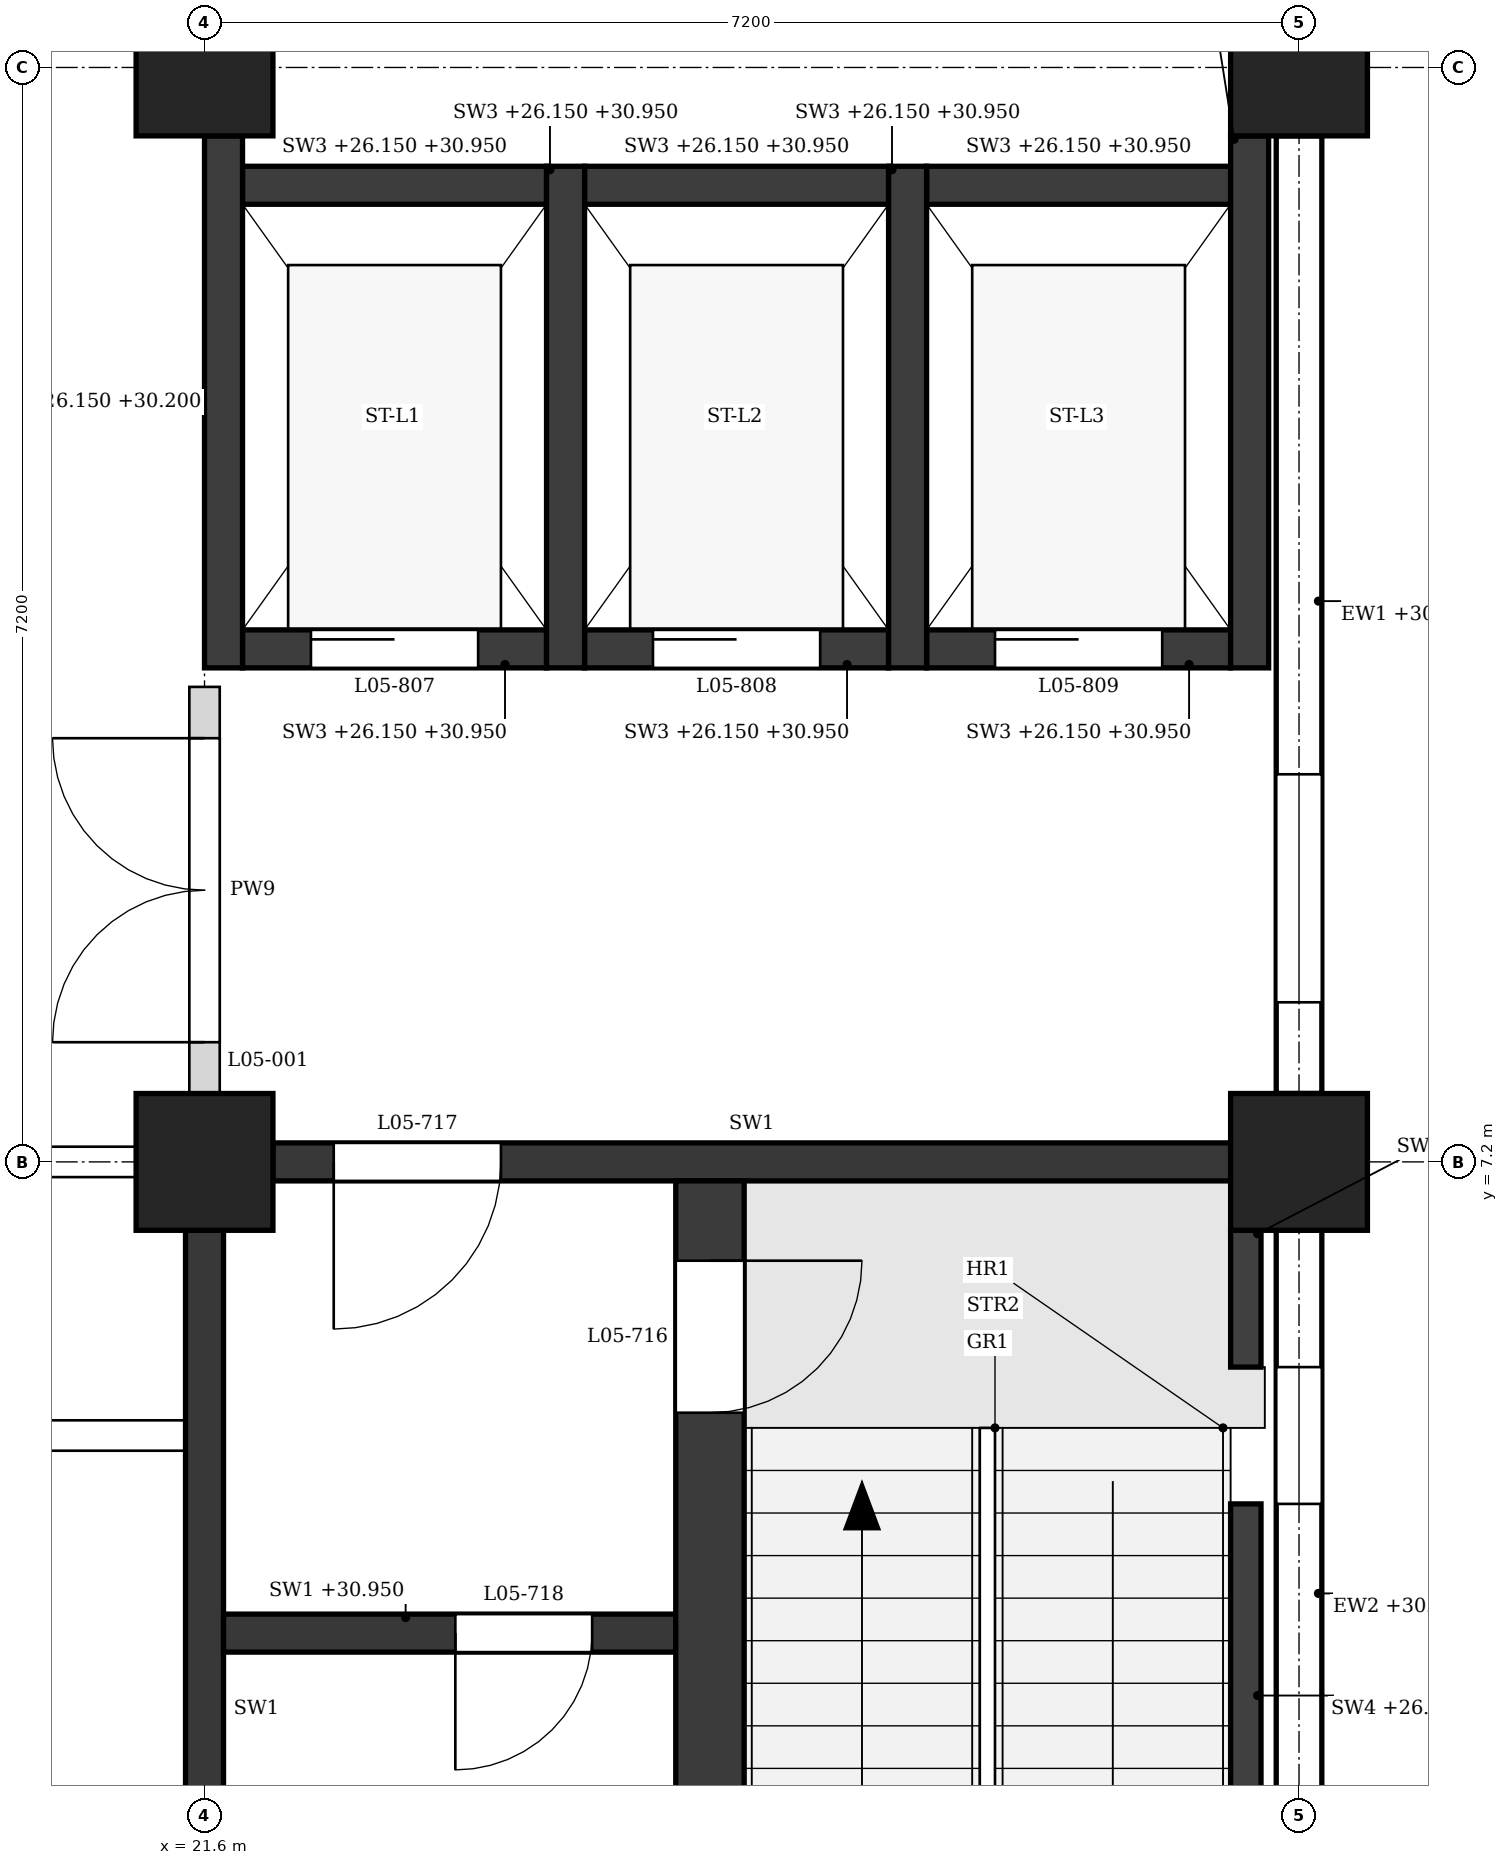
"""IFC4 building model, lengths in metres.
Left out: names, types, materials, properties, quantities, classifications, styles, units other than length and angle.
Written with IfcOpenShell. Run it as: python <this file> out.ifc"""

import sys

from ifc_helpers import new_model, si_unit, direction, frame, frame_2d, origin, origin_2d, place, context, subcontext, project, spatial, polyline, rectangle, outline, extrude, element, fill, save


model = new_model("IFC4")
c1 = context("Model", 3, precision=1e-05, world=origin(), true_north=direction((0.0, 1.0)))
c2 = subcontext(c1, "Body", "Model", "MODEL_VIEW")
j1 = project(units=[si_unit("LENGTHUNIT", "METRE"), si_unit("PLANEANGLEUNIT", "RADIAN")], contexts=[c1])
p1 = place(None, origin())
s1 = spatial("IfcSite", under=j1, at=p1, CompositionType="ELEMENT")
p2 = place(p1, origin())
s2 = spatial("IfcBuilding", under=s1, at=p2, CompositionType="ELEMENT")
p3 = place(p2, frame((0.0, 0.0, 26.4)))
s3 = spatial("IfcBuildingStorey", under=s2, at=p3, CompositionType="ELEMENT", Elevation=26.4)
for number, where, z_axis, x_axis in (
    (1, (21.6, 7.2, 0.0), (0.0, 0.0, 1.0), (1.0, 0.0, 0.0)),
    (2, (21.6, 14.4, 0.0), (0.0, 0.0, 1.0), (1.0, 0.0, 0.0)),
    (3, (28.8, 7.2, 0.0), (0.0, 0.0, 1.0), (1.0, 0.0, 0.0)),
    (4, (28.8, 14.4, 0.0), (0.0, 0.0, 1.0), (1.0, 0.0, 0.0)),
):
    element("IfcColumn", number, at=place(p3, frame(where, z_axis=z_axis, x_axis=x_axis)), inside=s3, PredefinedType="COLUMN", context=c2, shape_type="SweptSolid", body=[
        extrude(rectangle(XDim=0.9, YDim=0.9, at=origin_2d()), origin(), (0.0, 0.0, 1.0), 4.8),
    ])
p4 = place(p3, frame((28.8, 0.45, 0.0), z_axis=(0.0, 0.0, 1.0), x_axis=(0.0, 1.0, 0.0)))
e5 = element("IfcWall", 5, at=p4, inside=s3, PredefinedType="STANDARD", context=c2, shape_type="SweptSolid", body=[
    extrude(rectangle(XDim=6.3, YDim=0.3, at=frame_2d((3.15, 0.0))), origin(), (0.0, 0.0, 1.0), 3.95),
])
p5 = place(p4, frame((0.9, 0.0, 0.9)))
e6 = element("IfcOpeningElement", 6, at=p5, cuts=e5, PredefinedType="OPENING", context=c2, shape_type="SweptSolid", body=[
    extrude(outline(polyline([(0.0, 0.0), (0.9, 0.0), (0.9, 2.05), (0.45, 2.5), (0.0, 2.05), (0.0, 0.0)])), frame((0.0, 0.16, 0.0), z_axis=(0.0, -1.0, 0.0), x_axis=(1.0, 0.0, 0.0)), (0.0, 0.0, 1.0), 0.32),
])
p6 = place(p4, frame((4.5, 0.0, 0.9)))
e7 = element("IfcOpeningElement", 7, at=p6, cuts=e5, PredefinedType="OPENING", context=c2, shape_type="SweptSolid", body=[
    extrude(outline(polyline([(0.0, 0.0), (0.9, 0.0), (0.9, 2.05), (0.45, 2.5), (0.0, 2.05), (0.0, 0.0)])), frame((0.0, 0.16, 0.0), z_axis=(0.0, -1.0, 0.0), x_axis=(1.0, 0.0, 0.0)), (0.0, 0.0, 1.0), 0.32),
])
p7 = place(p3, frame((28.8, 7.65, 0.0), z_axis=(0.0, 0.0, 1.0), x_axis=(0.0, 1.0, 0.0)))
e8 = element("IfcWall", 8, at=p7, inside=s3, PredefinedType="STANDARD", context=c2, shape_type="SweptSolid", body=[
    extrude(rectangle(XDim=6.3, YDim=0.3, at=frame_2d((3.15, 0.0))), origin(), (0.0, 0.0, 1.0), 3.95),
])
p8 = place(p7, frame((0.6, 0.0, 0.9)))
e9 = element("IfcOpeningElement", 9, at=p8, cuts=e8, PredefinedType="OPENING", context=c2, shape_type="SweptSolid", body=[
    extrude(outline(polyline([(0.0, 0.0), (1.5, 0.0), (1.5, 1.75), (0.75, 2.5), (0.0, 1.75), (0.0, 0.0)])), frame((0.0, 0.16, 0.0), z_axis=(0.0, -1.0, 0.0), x_axis=(1.0, 0.0, 0.0)), (0.0, 0.0, 1.0), 0.32),
])
p9 = place(p3, frame((22.05, 7.2, 0.0), z_axis=(0.0, 0.0, 1.0), x_axis=(1.0, 0.0, 0.0)))
e10 = element("IfcWall", 10, at=p9, inside=s3, PredefinedType="SHEAR", context=c2, shape_type="SweptSolid", body=[
    extrude(rectangle(XDim=6.3, YDim=0.25, at=frame_2d((3.15, 0.0))), origin(), (0.0, 0.0, 1.0), 3.8),
])
p10 = place(p9, frame((0.4, 0.0, 0.0)))
e11 = element("IfcOpeningElement", 11, at=p10, cuts=e10, PredefinedType="OPENING", context=c2, shape_type="SweptSolid", body=[
    extrude(rectangle(XDim=1.1, YDim=2.1, at=frame_2d((0.55, 1.05))), frame((0.0, 0.135, 0.0), z_axis=(0.0, -1.0, 0.0), x_axis=(1.0, 0.0, 0.0)), (0.0, 0.0, 1.0), 0.27),
])
p11 = place(p3, frame((21.6, 0.45, 0.0), z_axis=(0.0, 0.0, 1.0), x_axis=(0.0, 1.0, 0.0)))
e12 = element("IfcWall", 12, at=p11, inside=s3, PredefinedType="SHEAR", context=c2, shape_type="SweptSolid", body=[
    extrude(rectangle(XDim=6.3, YDim=0.25, at=frame_2d((3.15, 0.0))), origin(), (0.0, 0.0, 1.0), 3.8),
])
p12 = place(p3, frame((28.45, 2.25, -0.25), z_axis=(0.0, 0.0, 1.0), x_axis=(0.0, 1.0, 0.0)))
e13 = element("IfcWall", 13, at=p12, inside=s3, PredefinedType="SHEAR", context=c2, shape_type="SweptSolid", body=[
    extrude(rectangle(XDim=2.7, YDim=0.2, at=frame_2d((1.35, 0.0))), origin(), (0.0, 0.0, 1.0), 4.8),
])
p13 = place(p3, frame((28.45, 5.85, -0.25), z_axis=(0.0, 0.0, 1.0), x_axis=(0.0, 1.0, 0.0)))
e14 = element("IfcWall", 14, at=p13, inside=s3, PredefinedType="SHEAR", context=c2, shape_type="SweptSolid", body=[
    extrude(rectangle(XDim=0.9, YDim=0.2, at=frame_2d((0.45, 0.0))), origin(), (0.0, 0.0, 1.0), 4.8),
])
p14 = place(p3, frame((24.925, 0.225, 0.0), z_axis=(0.0, 0.0, 1.0), x_axis=(0.0, 1.0, 0.0)))
e15 = element("IfcWall", 15, at=p14, inside=s3, PredefinedType="SHEAR", context=c2, shape_type="SweptSolid", body=[
    extrude(rectangle(XDim=6.85, YDim=0.45, at=frame_2d((3.425, 0.0))), origin(), (0.0, 0.0, 1.0), 4.55),
])
p15 = place(p14, frame((5.325, 0.0, 0.0)))
e16 = element("IfcOpeningElement", 16, at=p15, cuts=e15, PredefinedType="OPENING", context=c2, shape_type="SweptSolid", body=[
    extrude(rectangle(XDim=1.0, YDim=2.1, at=frame_2d((0.5, 1.05))), frame((0.0, 0.235, 0.0), z_axis=(0.0, -1.0, 0.0), x_axis=(1.0, 0.0, 0.0)), (0.0, 0.0, 1.0), 0.47),
])
p16 = place(p3, frame((21.725, 4.1, 0.0), z_axis=(0.0, 0.0, 1.0), x_axis=(1.0, 0.0, 0.0)))
e17 = element("IfcWall", 17, at=p16, inside=s3, PredefinedType="SHEAR", context=c2, shape_type="SweptSolid", body=[
    extrude(rectangle(XDim=2.975, YDim=0.25, at=frame_2d((1.487, 0.0))), origin(), (0.0, 0.0, 1.0), 4.55),
])
p17 = place(p16, frame((1.525, 0.0, 0.0)))
e18 = element("IfcOpeningElement", 18, at=p17, cuts=e17, PredefinedType="OPENING", context=c2, shape_type="SweptSolid", body=[
    extrude(rectangle(XDim=0.9, YDim=2.1, at=frame_2d((0.45, 1.05))), frame((0.0, 0.135, 0.0), z_axis=(0.0, -1.0, 0.0), x_axis=(1.0, 0.0, 0.0)), (0.0, 0.0, 1.0), 0.27),
])
p18 = place(p3, frame((21.725, 10.45, -0.25), z_axis=(0.0, 0.0, 1.0), x_axis=(0.0, 1.0, 0.0)))
e19 = element("IfcWall", 19, at=p18, inside=s3, PredefinedType="SHEAR", context=c2, shape_type="SweptSolid", body=[
    extrude(rectangle(XDim=3.5, YDim=0.25, at=frame_2d((1.75, 0.0))), origin(), (0.0, 0.0, 1.0), 4.05),
])
for number, where, z_axis, x_axis in (
    (20, (23.975, 10.45, -0.25), (0.0, 0.0, 1.0), (0.0, 1.0, 0.0)),
    (21, (26.225, 10.45, -0.25), (0.0, 0.0, 1.0), (0.0, 1.0, 0.0)),
):
    element("IfcWall", number, at=place(p3, frame(where, z_axis=z_axis, x_axis=x_axis)), inside=s3, PredefinedType="SHEAR", context=c2, shape_type="SweptSolid", body=[
        extrude(rectangle(XDim=3.3, YDim=0.25, at=frame_2d((1.65, 0.0))), origin(), (0.0, 0.0, 1.0), 4.8),
    ])
p19 = place(p3, frame((28.475, 10.45, -0.25), z_axis=(0.0, 0.0, 1.0), x_axis=(0.0, 1.0, 0.0)))
e22 = element("IfcWall", 22, at=p19, inside=s3, PredefinedType="SHEAR", context=c2, shape_type="SweptSolid", body=[
    extrude(rectangle(XDim=3.5, YDim=0.25, at=frame_2d((1.75, 0.0))), origin(), (0.0, 0.0, 1.0), 4.8),
])
p20 = place(p3, frame((21.85, 10.575, -0.25), z_axis=(0.0, 0.0, 1.0), x_axis=(1.0, 0.0, 0.0)))
e23 = element("IfcWall", 23, at=p20, inside=s3, PredefinedType="SHEAR", context=c2, shape_type="SweptSolid", body=[
    extrude(rectangle(XDim=2.0, YDim=0.25, at=frame_2d((1.0, 0.0))), origin(), (0.0, 0.0, 1.0), 4.8),
])
p21 = place(p20, frame((0.45, 0.0, 0.25)))
e24 = element("IfcOpeningElement", 24, at=p21, cuts=e23, PredefinedType="OPENING", context=c2, shape_type="SweptSolid", body=[
    extrude(rectangle(XDim=1.1, YDim=2.1, at=frame_2d((0.55, 1.05))), frame((0.0, 0.135, 0.0), z_axis=(0.0, -1.0, 0.0), x_axis=(1.0, 0.0, 0.0)), (0.0, 0.0, 1.0), 0.27),
])
p22 = place(p3, frame((21.85, 13.625, -0.25), z_axis=(0.0, 0.0, 1.0), x_axis=(1.0, 0.0, 0.0)))
e25 = element("IfcWall", 25, at=p22, inside=s3, PredefinedType="SHEAR", context=c2, shape_type="SweptSolid", body=[
    extrude(rectangle(XDim=2.0, YDim=0.25, at=frame_2d((1.0, 0.0))), origin(), (0.0, 0.0, 1.0), 4.8),
])
p23 = place(p3, frame((24.1, 10.575, -0.25), z_axis=(0.0, 0.0, 1.0), x_axis=(1.0, 0.0, 0.0)))
e26 = element("IfcWall", 26, at=p23, inside=s3, PredefinedType="SHEAR", context=c2, shape_type="SweptSolid", body=[
    extrude(rectangle(XDim=2.0, YDim=0.25, at=frame_2d((1.0, 0.0))), origin(), (0.0, 0.0, 1.0), 4.8),
])
p24 = place(p23, frame((0.45, 0.0, 0.25)))
e27 = element("IfcOpeningElement", 27, at=p24, cuts=e26, PredefinedType="OPENING", context=c2, shape_type="SweptSolid", body=[
    extrude(rectangle(XDim=1.1, YDim=2.1, at=frame_2d((0.55, 1.05))), frame((0.0, 0.135, 0.0), z_axis=(0.0, -1.0, 0.0), x_axis=(1.0, 0.0, 0.0)), (0.0, 0.0, 1.0), 0.27),
])
p25 = place(p3, frame((24.1, 13.625, -0.25), z_axis=(0.0, 0.0, 1.0), x_axis=(1.0, 0.0, 0.0)))
e28 = element("IfcWall", 28, at=p25, inside=s3, PredefinedType="SHEAR", context=c2, shape_type="SweptSolid", body=[
    extrude(rectangle(XDim=2.0, YDim=0.25, at=frame_2d((1.0, 0.0))), origin(), (0.0, 0.0, 1.0), 4.8),
])
p26 = place(p3, frame((26.35, 10.575, -0.25), z_axis=(0.0, 0.0, 1.0), x_axis=(1.0, 0.0, 0.0)))
e29 = element("IfcWall", 29, at=p26, inside=s3, PredefinedType="SHEAR", context=c2, shape_type="SweptSolid", body=[
    extrude(rectangle(XDim=2.0, YDim=0.25, at=frame_2d((1.0, 0.0))), origin(), (0.0, 0.0, 1.0), 4.8),
])
p27 = place(p26, frame((0.45, 0.0, 0.25)))
e30 = element("IfcOpeningElement", 30, at=p27, cuts=e29, PredefinedType="OPENING", context=c2, shape_type="SweptSolid", body=[
    extrude(rectangle(XDim=1.1, YDim=2.1, at=frame_2d((0.55, 1.05))), frame((0.0, 0.135, 0.0), z_axis=(0.0, -1.0, 0.0), x_axis=(1.0, 0.0, 0.0)), (0.0, 0.0, 1.0), 0.27),
])
p28 = place(p3, frame((26.35, 13.625, -0.25), z_axis=(0.0, 0.0, 1.0), x_axis=(1.0, 0.0, 0.0)))
e31 = element("IfcWall", 31, at=p28, inside=s3, PredefinedType="SHEAR", context=c2, shape_type="SweptSolid", body=[
    extrude(rectangle(XDim=2.0, YDim=0.25, at=frame_2d((1.0, 0.0))), origin(), (0.0, 0.0, 1.0), 4.8),
])
p29 = place(p3, frame((7.325, 5.4, 0.0), z_axis=(0.0, 0.0, 1.0), x_axis=(1.0, 0.0, 0.0)))
e32 = element("IfcWall", 32, at=p29, inside=s3, PredefinedType="PARTITIONING", context=c2, shape_type="SweptSolid", body=[
    extrude(outline(polyline([(0.0, 0.0), (14.15, 0.0), (14.15, 3.8), (14.025, 3.8), (14.025, 4.55), (7.325, 4.55), (7.325, 3.8), (6.825, 3.8), (6.825, 4.55), (0.125, 4.55), (0.125, 3.8), (0.0, 3.8), (0.0, 0.0)])), frame((0.0, 0.1, 0.0), z_axis=(0.0, -1.0, 0.0), x_axis=(1.0, 0.0, 0.0)), (0.0, 0.0, 1.0), 0.2),
])
p30 = place(p29, frame((1.238, 0.0, 0.0)))
e33 = element("IfcOpeningElement", 33, at=p30, cuts=e32, PredefinedType="OPENING", context=c2, shape_type="SweptSolid", body=[
    extrude(rectangle(XDim=1.0, YDim=2.1, at=frame_2d((0.5, 1.05))), frame((0.0, 0.11, 0.0), z_axis=(0.0, -1.0, 0.0), x_axis=(1.0, 0.0, 0.0)), (0.0, 0.0, 1.0), 0.22),
])
p31 = place(p29, frame((4.775, 0.0, 0.0)))
e34 = element("IfcOpeningElement", 34, at=p31, cuts=e32, PredefinedType="OPENING", context=c2, shape_type="SweptSolid", body=[
    extrude(rectangle(XDim=1.0, YDim=2.1, at=frame_2d((0.5, 1.05))), frame((0.0, 0.11, 0.0), z_axis=(0.0, -1.0, 0.0), x_axis=(1.0, 0.0, 0.0)), (0.0, 0.0, 1.0), 0.22),
])
p32 = place(p29, frame((8.375, 0.0, 0.0)))
e35 = element("IfcOpeningElement", 35, at=p32, cuts=e32, PredefinedType="OPENING", context=c2, shape_type="SweptSolid", body=[
    extrude(rectangle(XDim=1.0, YDim=2.1, at=frame_2d((0.5, 1.05))), frame((0.0, 0.11, 0.0), z_axis=(0.0, -1.0, 0.0), x_axis=(1.0, 0.0, 0.0)), (0.0, 0.0, 1.0), 0.22),
])
p33 = place(p29, frame((11.913, 0.0, 0.0)))
e36 = element("IfcOpeningElement", 36, at=p33, cuts=e32, PredefinedType="OPENING", context=c2, shape_type="SweptSolid", body=[
    extrude(rectangle(XDim=1.0, YDim=2.1, at=frame_2d((0.5, 1.05))), frame((0.0, 0.11, 0.0), z_axis=(0.0, -1.0, 0.0), x_axis=(1.0, 0.0, 0.0)), (0.0, 0.0, 1.0), 0.22),
])
p34 = place(p3, frame((14.85, 7.2, 0.0), z_axis=(0.0, 0.0, 1.0), x_axis=(1.0, 0.0, 0.0)))
e37 = element("IfcWall", 37, at=p34, inside=s3, PredefinedType="PARTITIONING", context=c2, shape_type="SweptSolid", body=[
    extrude(rectangle(XDim=6.3, YDim=0.2, at=frame_2d((3.15, 0.0))), origin(), (0.0, 0.0, 1.0), 3.8),
])
p35 = place(p34, frame((4.225, 0.0, 0.0)))
e38 = element("IfcOpeningElement", 38, at=p35, cuts=e37, PredefinedType="OPENING", context=c2, shape_type="SweptSolid", body=[
    extrude(rectangle(XDim=1.0, YDim=2.1, at=frame_2d((0.5, 1.05))), frame((0.0, 0.11, 0.0), z_axis=(0.0, -1.0, 0.0), x_axis=(1.0, 0.0, 0.0)), (0.0, 0.0, 1.0), 0.22),
])
p36 = place(p3, frame((21.6, 7.65, 0.0), z_axis=(0.0, 0.0, 1.0), x_axis=(0.0, 1.0, 0.0)))
e39 = element("IfcWall", 39, at=p36, inside=s3, PredefinedType="PARTITIONING", context=c2, shape_type="SweptSolid", body=[
    extrude(rectangle(XDim=2.675, YDim=0.2, at=frame_2d((1.337, 0.0))), origin(), (0.0, 0.0, 1.0), 3.8),
])
p37 = place(p36, frame((0.337, 0.0, 0.0)))
e40 = element("IfcOpeningElement", 40, at=p37, cuts=e39, PredefinedType="OPENING", context=c2, shape_type="SweptSolid", body=[
    extrude(rectangle(XDim=2.0, YDim=2.4, at=frame_2d((1.0, 1.2))), frame((0.0, 0.11, 0.0), z_axis=(0.0, -1.0, 0.0), x_axis=(1.0, 0.0, 0.0)), (0.0, 0.0, 1.0), 0.22),
])
p38 = place(p6, origin())
e41 = element("IfcWindow", 41, at=p38, inside=s3, PartitioningType="SINGLE_PANEL", PredefinedType="WINDOW", context=c2, shape_type="SweptSolid", body=[
    extrude(outline(polyline([(0.0, 0.0), (0.9, 0.0), (0.9, 2.05), (0.45, 2.5), (0.0, 2.05), (0.0, 0.0)])), frame((0.0, 0.03, 0.0), z_axis=(0.0, -1.0, 0.0), x_axis=(1.0, 0.0, 0.0)), (0.0, 0.0, 1.0), 0.06),
])
fill(e7, e41)
p39 = place(p8, origin())
e42 = element("IfcWindow", 42, at=p39, inside=s3, PartitioningType="SINGLE_PANEL", PredefinedType="WINDOW", context=c2, shape_type="SweptSolid", body=[
    extrude(outline(polyline([(0.0, 0.0), (1.5, 0.0), (1.5, 1.75), (0.75, 2.5), (0.0, 1.75), (0.0, 0.0)])), frame((0.0, 0.03, 0.0), z_axis=(0.0, -1.0, 0.0), x_axis=(1.0, 0.0, 0.0)), (0.0, 0.0, 1.0), 0.06),
])
fill(e9, e42)
p40 = place(p15, frame((1.0, 0.0, 0.0), z_axis=(0.0, 0.0, 1.0), x_axis=(-1.0, 0.0, 0.0)))
e43 = element("IfcDoor", 43, at=p40, inside=s3, OperationType="SINGLE_SWING_LEFT", PredefinedType="DOOR", context=c2, shape_type="SweptSolid", body=[
    extrude(rectangle(XDim=1.0, YDim=2.1, at=frame_2d((0.5, 1.05))), frame((0.0, 0.025, 0.0), z_axis=(0.0, -1.0, 0.0), x_axis=(1.0, 0.0, 0.0)), (0.0, 0.0, 1.0), 0.05),
])
fill(e16, e43)
p41 = place(p10, frame((1.1, 0.0, 0.0), z_axis=(0.0, 0.0, 1.0), x_axis=(-1.0, 0.0, 0.0)))
e44 = element("IfcDoor", 44, at=p41, inside=s3, OperationType="SINGLE_SWING_RIGHT", PredefinedType="DOOR", context=c2, shape_type="SweptSolid", body=[
    extrude(rectangle(XDim=1.1, YDim=2.1, at=frame_2d((0.55, 1.05))), frame((0.0, 0.025, 0.0), z_axis=(0.0, -1.0, 0.0), x_axis=(1.0, 0.0, 0.0)), (0.0, 0.0, 1.0), 0.05),
])
fill(e11, e44)
p42 = place(p17, frame((0.9, 0.0, 0.0), z_axis=(0.0, 0.0, 1.0), x_axis=(-1.0, 0.0, 0.0)))
e45 = element("IfcDoor", 45, at=p42, inside=s3, OperationType="SINGLE_SWING_RIGHT", PredefinedType="DOOR", context=c2, shape_type="SweptSolid", body=[
    extrude(rectangle(XDim=0.9, YDim=2.1, at=frame_2d((0.45, 1.05))), frame((0.0, 0.025, 0.0), z_axis=(0.0, -1.0, 0.0), x_axis=(1.0, 0.0, 0.0)), (0.0, 0.0, 1.0), 0.05),
])
fill(e18, e45)
p43 = place(p21, origin())
e46 = element("IfcDoor", 46, at=p43, inside=s3, OperationType="SLIDING_TO_LEFT", PredefinedType="DOOR", context=c2, shape_type="SweptSolid", body=[
    extrude(rectangle(XDim=1.1, YDim=2.1, at=frame_2d((0.55, 1.05))), frame((0.0, 0.025, 0.0), z_axis=(0.0, -1.0, 0.0), x_axis=(1.0, 0.0, 0.0)), (0.0, 0.0, 1.0), 0.05),
])
fill(e24, e46)
p44 = place(p24, origin())
e47 = element("IfcDoor", 47, at=p44, inside=s3, OperationType="SLIDING_TO_LEFT", PredefinedType="DOOR", context=c2, shape_type="SweptSolid", body=[
    extrude(rectangle(XDim=1.1, YDim=2.1, at=frame_2d((0.55, 1.05))), frame((0.0, 0.025, 0.0), z_axis=(0.0, -1.0, 0.0), x_axis=(1.0, 0.0, 0.0)), (0.0, 0.0, 1.0), 0.05),
])
fill(e27, e47)
p45 = place(p27, origin())
e48 = element("IfcDoor", 48, at=p45, inside=s3, OperationType="SLIDING_TO_LEFT", PredefinedType="DOOR", context=c2, shape_type="SweptSolid", body=[
    extrude(rectangle(XDim=1.1, YDim=2.1, at=frame_2d((0.55, 1.05))), frame((0.0, 0.025, 0.0), z_axis=(0.0, -1.0, 0.0), x_axis=(1.0, 0.0, 0.0)), (0.0, 0.0, 1.0), 0.05),
])
fill(e30, e48)
p46 = place(p37, origin())
e49 = element("IfcDoor", 49, at=p46, inside=s3, OperationType="DOUBLE_DOOR_SINGLE_SWING", PredefinedType="DOOR", context=c2, shape_type="SweptSolid", body=[
    extrude(rectangle(XDim=2.0, YDim=2.4, at=frame_2d((1.0, 1.2))), frame((0.0, 0.025, 0.0), z_axis=(0.0, -1.0, 0.0), x_axis=(1.0, 0.0, 0.0)), (0.0, 0.0, 1.0), 0.05),
])
fill(e40, e49)
save(model, sys.argv[1])
